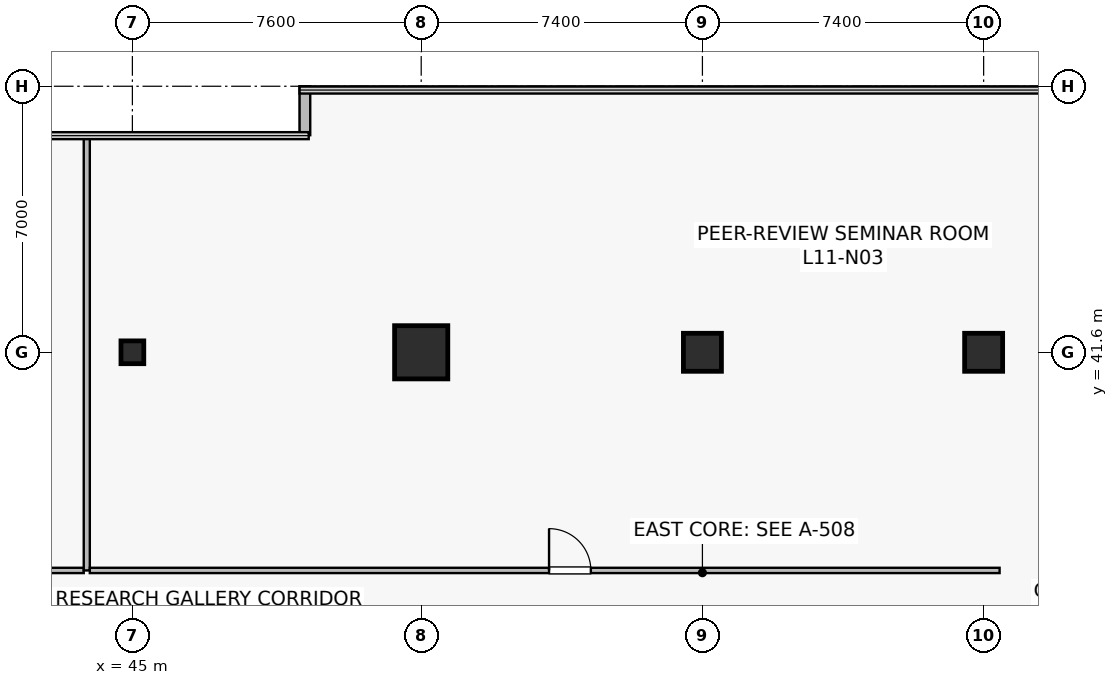
"""IFC4 building model, lengths in metres.
Left out: names, types, materials, properties, quantities, classifications, styles, units other than length and angle.
Written with IfcOpenShell. Run it as: python <this file> out.ifc"""

import sys

from ifc_helpers import new_model, si_unit, direction, frame, frame_2d, origin, origin_2d, place, context, subcontext, project, spatial, rectangle, hollow_rectangle, extrude, source, transform, mapped, element, fill, save


model = new_model("IFC4")
c1 = context("Model", 3, precision=1e-05, world=origin(), true_north=direction((0.0, 1.0)))
c2 = subcontext(c1, "Body", "Model", "MODEL_VIEW")
j1 = project(units=[si_unit("LENGTHUNIT", "METRE"), si_unit("PLANEANGLEUNIT", "RADIAN")], contexts=[c1])
p1 = place(None, origin())
s1 = spatial("IfcSite", under=j1, at=p1, CompositionType="ELEMENT")
p2 = place(p1, origin())
s2 = spatial("IfcBuilding", under=s1, at=p2, CompositionType="ELEMENT")
p3 = place(p2, frame((0.0, 0.0, 45.7)))
s3 = spatial("IfcBuildingStorey", under=s2, at=p3, CompositionType="ELEMENT", Elevation=45.7)
m1 = source(origin(), c2, "Body", "SweptSolid", [
    extrude(rectangle(XDim=1.4, YDim=1.4, at=origin_2d()), origin(), (0.0, 0.0, 1.0), 4.1),
])
p4 = place(p3, frame((52.6, 41.6, 0.0), z_axis=(0.0, 0.0, 1.0), x_axis=(1.0, 0.0, 0.0)))
e1 = element("IfcColumn", 1, at=p4, inside=s3, PredefinedType="COLUMN", context=c2, shape_type="MappedRepresentation", body=[
    mapped(m1, transform((0.0, 0.0, 0.0), scale=1.0)),
])
m2 = source(origin(), c2, "Body", "SweptSolid", [
    extrude(rectangle(XDim=1.0, YDim=1.0, at=origin_2d()), origin(), (0.0, 0.0, 1.0), 4.1),
])
for number, where, z_axis, x_axis in (
    (2, (60.0, 41.6, 0.0), (0.0, 0.0, 1.0), (1.0, 0.0, 0.0)),
    (3, (67.4, 41.6, 0.0), (0.0, 0.0, 1.0), (1.0, 0.0, 0.0)),
):
    element("IfcColumn", number, at=place(p3, frame(where, z_axis=z_axis, x_axis=x_axis)), inside=s3, PredefinedType="COLUMN", context=c2, shape_type="MappedRepresentation", body=[
        mapped(m2, transform((0.0, 0.0, 0.0), scale=1.0)),
    ])
m3 = source(origin(), c2, "Body", "SweptSolid", [
    extrude(hollow_rectangle(XDim=0.6, YDim=0.6, WallThickness=0.028, at=origin_2d()), origin(), (0.0, 0.0, 1.0), 4.1),
])
p5 = place(p3, frame((45.0, 41.6, 0.0), z_axis=(0.0, 0.0, 1.0), x_axis=(1.0, 0.0, 0.0)))
e4 = element("IfcColumn", 4, at=p5, inside=s3, PredefinedType="COLUMN", context=c2, shape_type="MappedRepresentation", body=[
    mapped(m3, transform((0.0, 0.0, 0.0), scale=1.0)),
])
p6 = place(p3, frame((49.54, 48.6, 0.0), z_axis=(0.0, 0.0, 1.0), x_axis=(0.0, -1.0, 0.0)))
e5 = element("IfcWall", 5, at=p6, inside=s3, PredefinedType="STANDARD", context=c2, shape_type="SweptSolid", body=[
    extrude(rectangle(XDim=1.288, YDim=0.28, at=frame_2d((0.644, 0.0))), origin(), (0.0, 0.0, 1.0), 3.78),
])
p7 = place(p3, frame((22.28, 35.86, 0.0), z_axis=(0.0, 0.0, 1.0), x_axis=(1.0, 0.0, 0.0)))
e6 = element("IfcWall", 6, at=p7, inside=s3, PredefinedType="PARTITIONING", context=c2, shape_type="SweptSolid", body=[
    extrude(rectangle(XDim=21.44, YDim=0.14, at=frame_2d((10.72, 0.0))), origin(), (0.0, 0.0, 1.0), 3.065),
])
p8 = place(p7, frame((8.402, 0.0, 0.0)))
e7 = element("IfcOpeningElement", 7, at=p8, cuts=e6, PredefinedType="OPENING", context=c2, shape_type="SweptSolid", body=[
    extrude(rectangle(XDim=1.1, YDim=2.18, at=frame_2d((0.55, 1.09))), frame((0.0, 0.08, 0.0), z_axis=(0.0, -1.0, 0.0), x_axis=(1.0, 0.0, 0.0)), (0.0, 0.0, 1.0), 0.16),
])
p9 = place(p3, frame((43.8, 35.86, 0.0), z_axis=(0.0, 0.0, 1.0), x_axis=(0.0, 1.0, 0.0)))
e8 = element("IfcWall", 8, at=p9, inside=s3, PredefinedType="PARTITIONING", context=c2, shape_type="SweptSolid", body=[
    extrude(rectangle(XDim=11.43, YDim=0.16, at=frame_2d((5.715, 0.0))), origin(), (0.0, 0.0, 1.0), 3.015),
])
p10 = place(p3, frame((43.88, 35.86, 0.0), z_axis=(0.0, 0.0, 1.0), x_axis=(1.0, 0.0, 0.0)))
e9 = element("IfcWall", 9, at=p10, inside=s3, PredefinedType="PARTITIONING", context=c2, shape_type="SweptSolid", body=[
    extrude(rectangle(XDim=23.94, YDim=0.14, at=frame_2d((11.97, 0.0))), origin(), (0.0, 0.0, 1.0), 3.065),
])
p11 = place(p10, frame((12.084, 0.0, 0.0)))
e10 = element("IfcOpeningElement", 10, at=p11, cuts=e9, PredefinedType="OPENING", context=c2, shape_type="SweptSolid", body=[
    extrude(rectangle(XDim=1.1, YDim=2.18, at=frame_2d((0.55, 1.09))), frame((0.0, 0.08, 0.0), z_axis=(0.0, -1.0, 0.0), x_axis=(1.0, 0.0, 0.0)), (0.0, 0.0, 1.0), 0.16),
])
m4 = source(origin(), c2, "Body", "SweptSolid", [
    extrude(rectangle(XDim=1.1, YDim=2.18, at=frame_2d((0.55, 1.09))), frame((0.0, 0.025, 0.0), z_axis=(0.0, -1.0, 0.0), x_axis=(1.0, 0.0, 0.0)), (0.0, 0.0, 1.0), 0.05),
])
p12 = place(p11, origin())
e11 = element("IfcDoor", 11, at=p12, inside=s3, OperationType="SINGLE_SWING_LEFT", PredefinedType="DOOR", context=c2, shape_type="MappedRepresentation", body=[
    mapped(m4, transform((0.0, 0.0, 0.0), scale=1.0)),
])
fill(e10, e11)
save(model, sys.argv[1])
